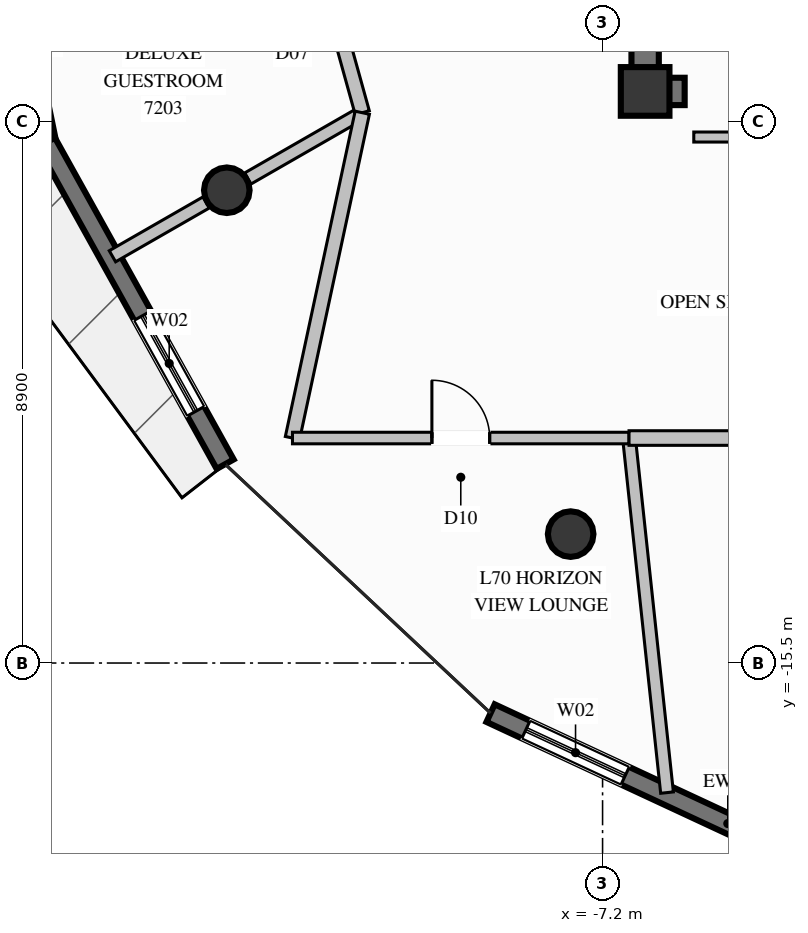
"""IFC4 building model, lengths in metres.
Left out: names, types, materials, properties, quantities, classifications, styles, units other than length and angle.
Written with IfcOpenShell. Run it as: python <this file> out.ifc"""

import sys

from ifc_helpers import new_model, si_unit, direction, frame, frame_2d, origin, origin_2d, place, context, subcontext, project, spatial, rectangle, circle, extrude, element, fill, save


model = new_model("IFC4")
c1 = context("Model", 3, precision=1e-05, world=origin(), true_north=direction((0.0, 1.0)))
c2 = subcontext(c1, "Body", "Model", "MODEL_VIEW")
j1 = project(units=[si_unit("LENGTHUNIT", "METRE"), si_unit("PLANEANGLEUNIT", "RADIAN")], contexts=[c1])
p1 = place(None, origin())
s1 = spatial("IfcSite", under=j1, at=p1, CompositionType="ELEMENT")
p2 = place(p1, origin())
s2 = spatial("IfcBuilding", under=s1, at=p2, CompositionType="ELEMENT")
p3 = place(p2, frame((0.0, 0.0, 270.6)))
s3 = spatial("IfcBuildingStorey", under=s2, at=p3, CompositionType="ELEMENT", Elevation=270.6)
p4 = place(p3, frame((-6.5, -6.1, 0.0), z_axis=(0.0, 0.0, 1.0), x_axis=(1.0, 0.0, 0.0)))
e1 = element("IfcColumn", 1, at=p4, inside=s3, PredefinedType="COLUMN", context=c2, shape_type="SweptSolid", body=[
    extrude(rectangle(XDim=0.8, YDim=0.8, at=origin_2d()), origin(), (0.0, 0.0, 1.0), 3.8),
])
p5 = place(p3, frame((-6.275, -6.1, 0.0), z_axis=(0.0, 0.0, 1.0), x_axis=(1.0, 0.0, 0.0)))
e2 = element("IfcWall", 2, at=p5, inside=s3, PredefinedType="SHEAR", context=c2, shape_type="SweptSolid", body=[
    extrude(rectangle(XDim=0.425, YDim=0.45, at=frame_2d((0.212, 0.0))), origin(), (0.0, 0.0, 1.0), 3.8),
])
p6 = place(p3, frame((-6.5, -6.325, 0.0), z_axis=(0.0, 0.0, 1.0), x_axis=(0.0, 1.0, 0.0)))
e3 = element("IfcWall", 3, at=p6, inside=s3, PredefinedType="SHEAR", context=c2, shape_type="SweptSolid", body=[
    extrude(rectangle(XDim=2.975, YDim=0.45, at=frame_2d((1.487, 0.0))), origin(), (0.0, 0.0, 1.0), 3.8),
])
for number, where, z_axis, x_axis in (
    (4, (-13.38, -7.725, 0.0), (0.0, 0.0, 1.0), (1.0, 0.0, 0.0)),
    (5, (-7.725, -13.38, 0.0), (0.0, 0.0, 1.0), (1.0, 0.0, 0.0)),
):
    element("IfcColumn", number, at=place(p3, frame(where, z_axis=z_axis, x_axis=x_axis)), inside=s3, PredefinedType="COLUMN", context=c2, shape_type="SweptSolid", body=[
        extrude(circle(Radius=0.375, at=origin_2d()), origin(), (0.0, 0.0, 1.0), 3.8),
    ])
p7 = place(p3, frame((-16.347, -6.939, 0.0), z_axis=(0.0, 0.0, 1.0), x_axis=(-0.201450639807, 0.979498667545, 0.0)))
e6 = element("IfcWall", 6, at=p7, inside=s3, PredefinedType="SOLIDWALL", context=c2, shape_type="SweptSolid", body=[
    extrude(rectangle(XDim=6.096, YDim=0.32, at=frame_2d((3.048, 0.0))), origin(), (0.0, 0.0, 1.0), 3.57),
])
p8 = place(p7, frame((2.148, 0.0, 0.35)))
e7 = element("IfcOpeningElement", 7, at=p8, cuts=e6, PredefinedType="OPENING", context=c2, shape_type="SweptSolid", body=[
    extrude(rectangle(XDim=1.8, YDim=2.6, at=frame_2d((0.9, 1.3))), frame((0.0, 0.17, 0.0), z_axis=(0.0, -1.0, 0.0), x_axis=(1.0, 0.0, 0.0)), (0.0, 0.0, 1.0), 0.34),
])
p9 = place(p3, frame((-13.407, -12.23, 0.0), z_axis=(0.0, 0.0, 1.0), x_axis=(-0.485704572822, 0.87412302792, 0.0)))
e8 = element("IfcWall", 8, at=p9, inside=s3, PredefinedType="SOLIDWALL", context=c2, shape_type="SweptSolid", body=[
    extrude(rectangle(XDim=6.053, YDim=0.32, at=frame_2d((3.026, 0.0))), origin(), (0.0, 0.0, 1.0), 3.57),
])
p10 = place(p9, frame((0.995, 0.0, 0.35)))
e9 = element("IfcOpeningElement", 9, at=p10, cuts=e8, PredefinedType="OPENING", context=c2, shape_type="SweptSolid", body=[
    extrude(rectangle(XDim=1.8, YDim=2.6, at=frame_2d((0.9, 1.3))), frame((0.0, 0.17, 0.0), z_axis=(0.0, -1.0, 0.0), x_axis=(1.0, 0.0, 0.0)), (0.0, 0.0, 1.0), 0.34),
])
p11 = place(p3, frame((-3.679, -18.82, 0.0), z_axis=(0.0, 0.0, 1.0), x_axis=(-0.90661391217, 0.421961152548, 0.0)))
e10 = element("IfcWall", 10, at=p11, inside=s3, PredefinedType="SOLIDWALL", context=c2, shape_type="SweptSolid", body=[
    extrude(rectangle(XDim=5.916, YDim=0.32, at=frame_2d((2.958, 0.0))), origin(), (0.0, 0.0, 1.0), 3.57),
])
p12 = place(p11, frame((3.474, 0.0, 0.35)))
e11 = element("IfcOpeningElement", 11, at=p12, cuts=e10, PredefinedType="OPENING", context=c2, shape_type="SweptSolid", body=[
    extrude(rectangle(XDim=1.8, YDim=2.6, at=frame_2d((0.9, 1.3))), frame((0.0, 0.17, 0.0), z_axis=(0.0, -1.0, 0.0), x_axis=(1.0, 0.0, 0.0)), (0.0, 0.0, 1.0), 0.34),
])
p13 = place(p3, frame((-5.7, -6.85, 0.0), z_axis=(0.0, 0.0, 1.0), x_axis=(1.0, 0.0, 0.0)))
e12 = element("IfcWall", 12, at=p13, inside=s3, PredefinedType="PARTITIONING", context=c2, shape_type="SweptSolid", body=[
    extrude(rectangle(XDim=9.65, YDim=0.165, at=frame_2d((4.825, 0.0))), origin(), (0.0, 0.0, 1.0), 2.655),
])
p14 = place(p13, frame((4.35, 0.0, 0.0)))
e13 = element("IfcOpeningElement", 13, at=p14, cuts=e12, PredefinedType="OPENING", context=c2, shape_type="SweptSolid", body=[
    extrude(rectangle(XDim=0.95, YDim=2.1, at=frame_2d((0.475, 1.05))), frame((0.0, 0.093, 0.0), z_axis=(0.0, -1.0, 0.0), x_axis=(1.0, 0.0, 0.0)), (0.0, 0.0, 1.0), 0.185),
])
p15 = place(p3, frame((-11.152, -6.45, 0.0), z_axis=(0.0, 0.0, 1.0), x_axis=(-0.867022876226, -0.498268333433, 0.0)))
e14 = element("IfcWall", 14, at=p15, inside=s3, PredefinedType="PARTITIONING", context=c2, shape_type="SweptSolid", body=[
    extrude(rectangle(XDim=2.172, YDim=0.21, at=frame_2d((1.086, 0.0))), origin(), (0.0, 0.0, 1.0), 3.011),
])
p16 = place(p3, frame((-13.72, -7.926, 0.0), z_axis=(0.0, 0.0, 1.0), x_axis=(-0.867167400639, -0.498016766052, 0.0)))
e15 = element("IfcWall", 15, at=p16, inside=s3, PredefinedType="PARTITIONING", context=c2, shape_type="SweptSolid", body=[
    extrude(rectangle(XDim=1.777, YDim=0.21, at=frame_2d((0.889, 0.0))), origin(), (0.0, 0.0, 1.0), 3.57),
])
p17 = place(p3, frame((-12.166, -2.796, 0.0), z_axis=(0.0, 0.0, 1.0), x_axis=(0.267374891444, -0.963592583733, 0.0)))
e16 = element("IfcWall", 16, at=p17, inside=s3, PredefinedType="PARTITIONING", context=c2, shape_type="SweptSolid", body=[
    extrude(rectangle(XDim=3.792, YDim=0.24, at=frame_2d((1.896, 0.0))), origin(), (0.0, 0.0, 1.0), 3.57),
])
p18 = place(p17, frame((1.396, 0.0, 0.0)))
e17 = element("IfcOpeningElement", 17, at=p18, cuts=e16, PredefinedType="OPENING", context=c2, shape_type="SweptSolid", body=[
    extrude(rectangle(XDim=1.0, YDim=2.2, at=frame_2d((0.5, 1.1))), frame((0.0, 0.13, 0.0), z_axis=(0.0, -1.0, 0.0), x_axis=(1.0, 0.0, 0.0)), (0.0, 0.0, 1.0), 0.26),
])
p19 = place(p3, frame((-6.765, -11.8, 0.0), z_axis=(0.0, 0.0, 1.0), x_axis=(0.106574281644, -0.994304743271, 0.0)))
e18 = element("IfcWall", 18, at=p19, inside=s3, PredefinedType="PARTITIONING", context=c2, shape_type="SweptSolid", body=[
    extrude(rectangle(XDim=5.865, YDim=0.21, at=frame_2d((2.932, 0.0))), origin(), (0.0, 0.0, 1.0), 3.57),
])
p20 = place(p3, frame((-11.152, -6.45, 0.0), z_axis=(0.0, 0.0, 1.0), x_axis=(-0.209791126954, -0.977746226304, 0.0)))
e19 = element("IfcWall", 19, at=p20, inside=s3, PredefinedType="PARTITIONING", context=c2, shape_type="SweptSolid", body=[
    extrude(rectangle(XDim=5.472, YDim=0.24, at=frame_2d((2.736, 0.0))), origin(), (0.0, 0.0, 1.0), 3.57),
])
p21 = place(p3, frame((-12.3, -11.8, 0.0), z_axis=(0.0, 0.0, 1.0), x_axis=(1.0, 0.0, 0.0)))
e20 = element("IfcWall", 20, at=p21, inside=s3, PredefinedType="PARTITIONING", context=c2, shape_type="SweptSolid", body=[
    extrude(rectangle(XDim=5.535, YDim=0.19, at=frame_2d((2.768, 0.0))), origin(), (0.0, 0.0, 1.0), 3.57),
])
p22 = place(p21, frame((2.293, 0.0, 0.0)))
e21 = element("IfcOpeningElement", 21, at=p22, cuts=e20, PredefinedType="OPENING", context=c2, shape_type="SweptSolid", body=[
    extrude(rectangle(XDim=0.95, YDim=2.1, at=frame_2d((0.475, 1.05))), frame((0.0, 0.105, 0.0), z_axis=(0.0, -1.0, 0.0), x_axis=(1.0, 0.0, 0.0)), (0.0, 0.0, 1.0), 0.21),
])
p23 = place(p3, frame((-6.765, -11.8, 0.0), z_axis=(0.0, 0.0, 1.0), x_axis=(1.0, 0.0, 0.0)))
e22 = element("IfcWall", 22, at=p23, inside=s3, PredefinedType="PARTITIONING", context=c2, shape_type="SweptSolid", body=[
    extrude(rectangle(XDim=6.765, YDim=0.24, at=frame_2d((3.382, 0.0))), origin(), (0.0, 0.0, 1.0), 3.57),
])
p24 = place(p10, origin())
e23 = element("IfcWindow", 23, at=p24, inside=s3, PartitioningType="SINGLE_PANEL", PredefinedType="WINDOW", context=c2, shape_type="SweptSolid", body=[
    extrude(rectangle(XDim=1.8, YDim=2.6, at=frame_2d((0.9, 1.3))), frame((0.0, 0.03, 0.0), z_axis=(0.0, -1.0, 0.0), x_axis=(1.0, 0.0, 0.0)), (0.0, 0.0, 1.0), 0.06),
])
fill(e9, e23)
p25 = place(p12, origin())
e24 = element("IfcWindow", 24, at=p25, inside=s3, PartitioningType="SINGLE_PANEL", PredefinedType="WINDOW", context=c2, shape_type="SweptSolid", body=[
    extrude(rectangle(XDim=1.8, YDim=2.6, at=frame_2d((0.9, 1.3))), frame((0.0, 0.03, 0.0), z_axis=(0.0, -1.0, 0.0), x_axis=(1.0, 0.0, 0.0)), (0.0, 0.0, 1.0), 0.06),
])
fill(e11, e24)
p26 = place(p22, origin())
e25 = element("IfcDoor", 25, at=p26, inside=s3, OperationType="SINGLE_SWING_LEFT", PredefinedType="DOOR", context=c2, shape_type="SweptSolid", body=[
    extrude(rectangle(XDim=0.95, YDim=2.1, at=frame_2d((0.475, 1.05))), frame((0.0, 0.025, 0.0), z_axis=(0.0, -1.0, 0.0), x_axis=(1.0, 0.0, 0.0)), (0.0, 0.0, 1.0), 0.05),
])
fill(e21, e25)
save(model, sys.argv[1])
